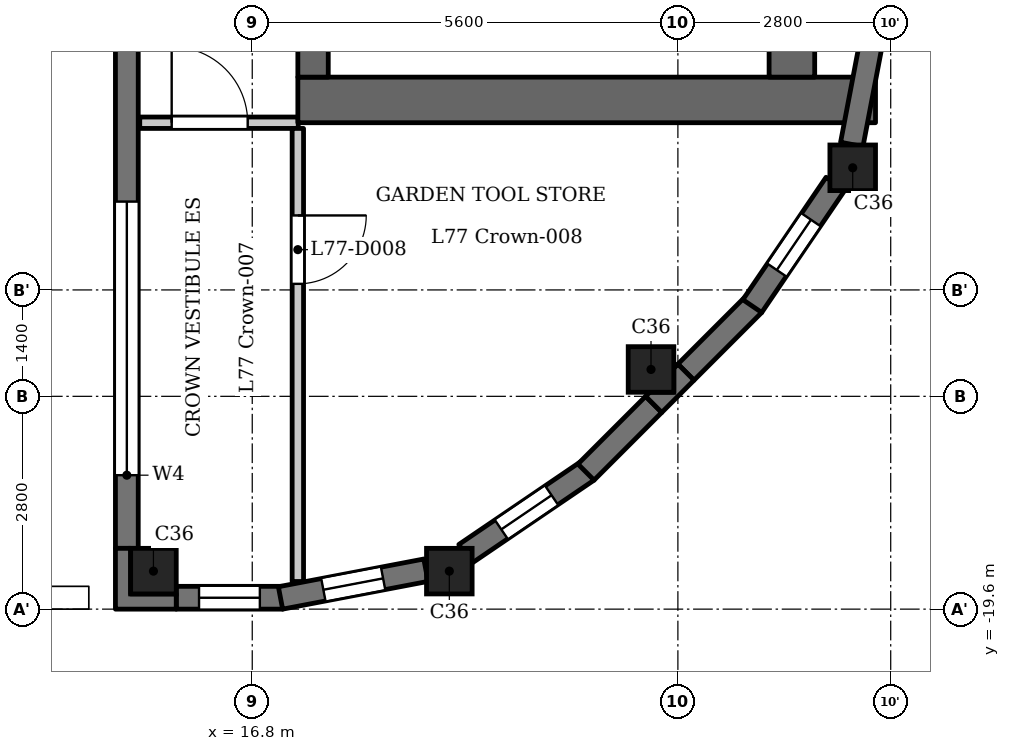
"""IFC4 building model, lengths in metres.
Left out: names, types, materials, properties, quantities, classifications, styles, units other than length and angle.
Written with IfcOpenShell. Run it as: python <this file> out.ifc"""

import sys

from ifc_helpers import new_model, si_unit, direction, frame, frame_2d, origin, origin_2d, place, context, subcontext, project, spatial, polyline, rectangle, outline, extrude, element, fill, save


model = new_model("IFC4")
c1 = context("Model", 3, precision=1e-05, world=origin(), true_north=direction((0.0, 1.0)))
c2 = subcontext(c1, "Body", "Model", "MODEL_VIEW")
j1 = project(units=[si_unit("LENGTHUNIT", "METRE"), si_unit("PLANEANGLEUNIT", "RADIAN")], contexts=[c1])
p1 = place(None, origin())
s1 = spatial("IfcSite", under=j1, at=p1, CompositionType="ELEMENT")
p2 = place(p1, origin())
s2 = spatial("IfcBuilding", under=s1, at=p2, CompositionType="ELEMENT")
p3 = place(p2, frame((0.0, 0.0, 299.9)))
s3 = spatial("IfcBuildingStorey", under=s2, at=p3, CompositionType="ELEMENT", Elevation=299.9)
for number, where, z_axis, x_axis in (
    (1, (15.5, -19.1, 0.0), (0.0, 0.0, 1.0), (1.0, 0.0, 0.0)),
    (2, (19.393, -19.1, 0.0), (0.0, 0.0, 1.0), (1.0, 0.0, 0.0)),
    (3, (22.046, -16.446, 0.0), (0.0, 0.0, 1.0), (1.0, 0.0, 0.0)),
    (4, (24.7, -13.793, 0.0), (0.0, 0.0, 1.0), (1.0, 0.0, 0.0)),
):
    element("IfcColumn", number, at=place(p3, frame(where, z_axis=z_axis, x_axis=x_axis)), inside=s3, PredefinedType="COLUMN", context=c2, shape_type="SweptSolid", body=[
        extrude(rectangle(XDim=0.6, YDim=0.6, at=origin_2d()), origin(), (0.0, 0.0, 1.0), 3.5),
    ])
p4 = place(p3, frame((15.15, -11.5, 0.0), z_axis=(0.0, 0.0, 1.0), x_axis=(0.0, -1.0, 0.0)))
e5 = element("IfcWall", 5, at=p4, inside=s3, PredefinedType="SOLIDWALL", context=c2, shape_type="SweptSolid", body=[
    extrude(rectangle(XDim=7.3, YDim=0.3, at=frame_2d((3.65, 0.0))), origin(), (0.0, 0.0, 1.0), 3.2),
])
p5 = place(p4, frame((2.738, 0.0, 1.2)))
e6 = element("IfcOpeningElement", 6, at=p5, cuts=e5, PredefinedType="OPENING", context=c2, shape_type="SweptSolid", body=[
    extrude(rectangle(XDim=3.6, YDim=0.95, at=frame_2d((1.8, 0.475))), frame((0.0, 0.16, 0.0), z_axis=(0.0, -1.0, 0.0), x_axis=(1.0, 0.0, 0.0)), (0.0, 0.0, 1.0), 0.32),
])
p6 = place(p3, frame((15.8, -19.45, 0.0), z_axis=(0.0, 0.0, 1.0), x_axis=(1.0, 0.0, 0.0)))
e7 = element("IfcWall", 7, at=p6, inside=s3, PredefinedType="SOLIDWALL", context=c2, shape_type="SweptSolid", body=[
    extrude(rectangle(XDim=1.4, YDim=0.3, at=frame_2d((0.7, 0.0))), origin(), (0.0, 0.0, 1.0), 3.2),
])
p7 = place(p6, frame((0.3, 0.0, 0.6)))
e8 = element("IfcOpeningElement", 8, at=p7, cuts=e7, PredefinedType="OPENING", context=c2, shape_type="SweptSolid", body=[
    extrude(rectangle(XDim=0.8, YDim=1.55, at=frame_2d((0.4, 0.775))), frame((0.0, 0.16, 0.0), z_axis=(0.0, -1.0, 0.0), x_axis=(1.0, 0.0, 0.0)), (0.0, 0.0, 1.0), 0.32),
])
p8 = place(p3, frame((17.172, -19.453, 0.0), z_axis=(0.0, 0.0, 1.0), x_axis=(0.982286967073, 0.187382801553, 0.0)))
e9 = element("IfcWall", 9, at=p8, inside=s3, PredefinedType="SOLIDWALL", context=c2, shape_type="SweptSolid", body=[
    extrude(rectangle(XDim=1.948, YDim=0.3, at=frame_2d((0.974, 0.0))), origin(), (0.0, 0.0, 1.0), 2.6),
])
p9 = place(p8, frame((0.574, 0.0, 0.6)))
e10 = element("IfcOpeningElement", 10, at=p9, cuts=e9, PredefinedType="OPENING", context=c2, shape_type="SweptSolid", body=[
    extrude(rectangle(XDim=0.8, YDim=1.55, at=frame_2d((0.4, 0.775))), frame((0.0, 0.16, 0.0), z_axis=(0.0, -1.0, 0.0), x_axis=(1.0, 0.0, 0.0)), (0.0, 0.0, 1.0), 0.32),
])
p10 = place(p3, frame((19.602, -18.874, 0.0), z_axis=(0.0, 0.0, 1.0), x_axis=(0.827022075481, 0.562169446579, 0.0)))
e11 = element("IfcWall", 11, at=p10, inside=s3, PredefinedType="SOLIDWALL", context=c2, shape_type="SweptSolid", body=[
    extrude(rectangle(XDim=1.948, YDim=0.3, at=frame_2d((0.974, 0.0))), origin(), (0.0, 0.0, 1.0), 2.6),
])
p11 = place(p10, frame((0.574, 0.0, 0.6)))
e12 = element("IfcOpeningElement", 12, at=p11, cuts=e11, PredefinedType="OPENING", context=c2, shape_type="SweptSolid", body=[
    extrude(rectangle(XDim=0.8, YDim=1.55, at=frame_2d((0.4, 0.775))), frame((0.0, 0.16, 0.0), z_axis=(0.0, -1.0, 0.0), x_axis=(1.0, 0.0, 0.0)), (0.0, 0.0, 1.0), 0.32),
])
for number, where, z_axis, x_axis in (
    (13, (21.191, -17.797, 0.0), (0.0, 0.0, 1.0), (0.707, 0.707, 0.0)),
    (14, (22.506, -16.482, 0.0), (0.0, 0.0, 1.0), (0.707, 0.707, 0.0)),
):
    element("IfcWall", number, at=place(p3, frame(where, z_axis=z_axis, x_axis=x_axis)), inside=s3, PredefinedType="SOLIDWALL", context=c2, shape_type="SweptSolid", body=[
        extrude(rectangle(XDim=1.26, YDim=0.3, at=frame_2d((0.63, 0.0))), origin(), (0.0, 0.0, 1.0), 3.2),
    ])
p12 = place(p3, frame((23.379, -15.613, 0.0), z_axis=(0.0, 0.0, 1.0), x_axis=(0.562025435703, 0.827119948752, 0.0)))
e15 = element("IfcWall", 15, at=p12, inside=s3, PredefinedType="SOLIDWALL", context=c2, shape_type="SweptSolid", body=[
    extrude(rectangle(XDim=1.948, YDim=0.3, at=frame_2d((0.974, 0.0))), origin(), (0.0, 0.0, 1.0), 2.6),
])
p13 = place(p12, frame((0.574, 0.0, 0.6)))
e16 = element("IfcOpeningElement", 16, at=p13, cuts=e15, PredefinedType="OPENING", context=c2, shape_type="SweptSolid", body=[
    extrude(rectangle(XDim=0.8, YDim=1.55, at=frame_2d((0.4, 0.775))), frame((0.0, 0.16, 0.0), z_axis=(0.0, -1.0, 0.0), x_axis=(1.0, 0.0, 0.0)), (0.0, 0.0, 1.0), 0.32),
])
p14 = place(p3, frame((24.688, -13.485, 0.0), z_axis=(0.0, 0.0, 1.0), x_axis=(0.187354129902, 0.982292436095, 0.0)))
e17 = element("IfcWall", 17, at=p14, inside=s3, PredefinedType="SOLIDWALL", context=c2, shape_type="SweptSolid", body=[
    extrude(rectangle(XDim=1.947, YDim=0.3, at=frame_2d((0.973, 0.0))), origin(), (0.0, 0.0, 1.0), 2.6),
])
p15 = place(p3, origin())
e18 = element("IfcWall", 18, at=p15, inside=s3, PredefinedType="PARAPET", context=c2, shape_type="SweptSolid", body=[
    extrude(outline(polyline([(-14.65, -19.6), (14.65, -19.6), (14.65, -19.3), (-14.65, -19.3), (-14.65, -19.6)])), origin(), (0.0, 0.0, 1.0), 1.1),
])
p16 = place(p3, frame((17.4, -12.9, 0.0), z_axis=(0.0, 0.0, 1.0), x_axis=(1.0, 0.0, 0.0)))
e19 = element("IfcWall", 19, at=p16, inside=s3, PredefinedType="SHEAR", context=c2, shape_type="SweptSolid", body=[
    extrude(rectangle(XDim=7.6, YDim=0.6, at=frame_2d((3.8, 0.0))), origin(), (0.0, 0.0, 1.0), 3.2),
])
p17 = place(p3, frame((17.6, -12.6, 0.0), z_axis=(0.0, 0.0, 1.0), x_axis=(0.0, 1.0, 0.0)))
e20 = element("IfcWall", 20, at=p17, inside=s3, PredefinedType="SHEAR", context=c2, shape_type="SweptSolid", body=[
    extrude(rectangle(XDim=25.2, YDim=0.4, at=frame_2d((12.6, 0.0))), origin(), (0.0, 0.0, 1.0), 3.2),
])
p18 = place(p17, frame((11.2, 0.0, 0.0)))
e21 = element("IfcOpeningElement", 21, at=p18, cuts=e20, PredefinedType="OPENING", context=c2, shape_type="SweptSolid", body=[
    extrude(rectangle(XDim=0.9, YDim=2.1, at=frame_2d((0.45, 1.05))), frame((0.0, 0.21, 0.0), z_axis=(0.0, -1.0, 0.0), x_axis=(1.0, 0.0, 0.0)), (0.0, 0.0, 1.0), 0.42),
])
p19 = place(p17, frame((17.05, 0.0, 0.0)))
e22 = element("IfcOpeningElement", 22, at=p19, cuts=e20, PredefinedType="OPENING", context=c2, shape_type="SweptSolid", body=[
    extrude(rectangle(XDim=0.9, YDim=2.1, at=frame_2d((0.45, 1.05))), frame((0.0, 0.21, 0.0), z_axis=(0.0, -1.0, 0.0), x_axis=(1.0, 0.0, 0.0)), (0.0, 0.0, 1.0), 0.42),
])
p20 = place(p17, frame((23.25, 0.0, 0.0)))
e23 = element("IfcOpeningElement", 23, at=p20, cuts=e20, PredefinedType="OPENING", context=c2, shape_type="SweptSolid", body=[
    extrude(rectangle(XDim=1.1, YDim=2.1, at=frame_2d((0.55, 1.05))), frame((0.0, 0.21, 0.0), z_axis=(0.0, -1.0, 0.0), x_axis=(1.0, 0.0, 0.0)), (0.0, 0.0, 1.0), 0.42),
])
p21 = place(p17, frame((0.85, 0.0, 0.0)))
e24 = element("IfcOpeningElement", 24, at=p21, cuts=e20, PredefinedType="OPENING", context=c2, shape_type="SweptSolid", body=[
    extrude(rectangle(XDim=1.1, YDim=2.1, at=frame_2d((0.55, 1.05))), frame((0.0, 0.21, 0.0), z_axis=(0.0, -1.0, 0.0), x_axis=(1.0, 0.0, 0.0)), (0.0, 0.0, 1.0), 0.42),
])
p22 = place(p17, frame((13.075, 0.0, 0.0)))
e25 = element("IfcOpeningElement", 25, at=p22, cuts=e20, PredefinedType="OPENING", context=c2, shape_type="SweptSolid", body=[
    extrude(rectangle(XDim=1.8, YDim=2.1, at=frame_2d((0.9, 1.05))), frame((0.0, 0.21, 0.0), z_axis=(0.0, -1.0, 0.0), x_axis=(1.0, 0.0, 0.0)), (0.0, 0.0, 1.0), 0.42),
])
p23 = place(p3, frame((23.9, -12.6, 0.0), z_axis=(0.0, 0.0, 1.0), x_axis=(0.0, 1.0, 0.0)))
e26 = element("IfcWall", 26, at=p23, inside=s3, PredefinedType="SHEAR", context=c2, shape_type="SweptSolid", body=[
    extrude(rectangle(XDim=25.2, YDim=0.6, at=frame_2d((12.6, 0.0))), origin(), (0.0, 0.0, 1.0), 3.2),
])
p24 = place(p3, frame((15.32, -13.2, 0.0), z_axis=(0.0, 0.0, 1.0), x_axis=(1.0, 0.0, 0.0)))
e27 = element("IfcWall", 27, at=p24, inside=s3, PredefinedType="PARTITIONING", context=c2, shape_type="SweptSolid", body=[
    extrude(rectangle(XDim=2.085, YDim=0.15, at=frame_2d((1.042, 0.0))), origin(), (0.0, 0.0, 1.0), 3.2),
])
p25 = place(p24, frame((0.42, 0.0, 0.0)))
e28 = element("IfcOpeningElement", 28, at=p25, cuts=e27, PredefinedType="OPENING", context=c2, shape_type="SweptSolid", body=[
    extrude(rectangle(XDim=1.0, YDim=2.1, at=frame_2d((0.5, 1.05))), frame((0.0, 0.085, 0.0), z_axis=(0.0, -1.0, 0.0), x_axis=(1.0, 0.0, 0.0)), (0.0, 0.0, 1.0), 0.17),
])
p26 = place(p3, frame((17.4, -19.236, 0.0), z_axis=(0.0, 0.0, 1.0), x_axis=(0.0, 1.0, 0.0)))
e29 = element("IfcWall", 29, at=p26, inside=s3, PredefinedType="PARTITIONING", context=c2, shape_type="SweptSolid", body=[
    extrude(rectangle(XDim=5.961, YDim=0.15, at=frame_2d((2.981, 0.0))), origin(), (0.0, 0.0, 1.0), 3.2),
])
p27 = place(p26, frame((3.917, 0.0, 0.0)))
e30 = element("IfcOpeningElement", 30, at=p27, cuts=e29, PredefinedType="OPENING", context=c2, shape_type="SweptSolid", body=[
    extrude(rectangle(XDim=0.9, YDim=2.1, at=frame_2d((0.45, 1.05))), frame((0.0, 0.085, 0.0), z_axis=(0.0, -1.0, 0.0), x_axis=(1.0, 0.0, 0.0)), (0.0, 0.0, 1.0), 0.17),
])
e31 = element("IfcWall", 31, at=p15, inside=s3, PredefinedType="SOLIDWALL", context=c2, shape_type="SweptSolid", body=[
    extrude(outline(polyline([(21.976, -16.8), (22.188, -17.012), (22.612, -16.588), (22.4, -16.376), (22.346, -16.429), (22.346, -16.746), (22.029, -16.746), (21.976, -16.8)])), origin(), (0.0, 0.0, 1.0), 3.2),
])
e32 = element("IfcWall", 32, at=p15, inside=s3, PredefinedType="SOLIDWALL", context=c2, shape_type="SweptSolid", body=[
    extrude(outline(polyline([(15.0, -18.8), (15.0, -19.6), (15.8, -19.6), (15.8, -19.4), (15.2, -19.4), (15.2, -18.8), (15.0, -18.8)])), origin(), (0.0, 0.0, 1.0), 3.2),
])
p28 = place(p25, origin())
e33 = element("IfcDoor", 33, at=p28, inside=s3, OperationType="SINGLE_SWING_RIGHT", PredefinedType="DOOR", context=c2, shape_type="SweptSolid", body=[
    extrude(rectangle(XDim=1.0, YDim=2.1, at=frame_2d((0.5, 1.05))), frame((0.0, 0.025, 0.0), z_axis=(0.0, -1.0, 0.0), x_axis=(1.0, 0.0, 0.0)), (0.0, 0.0, 1.0), 0.05),
])
fill(e28, e33)
p29 = place(p27, origin())
e34 = element("IfcDoor", 34, at=p29, inside=s3, OperationType="SINGLE_SWING_RIGHT", PredefinedType="DOOR", context=c2, shape_type="SweptSolid", body=[
    extrude(rectangle(XDim=0.9, YDim=2.1, at=frame_2d((0.45, 1.05))), frame((0.0, 0.025, 0.0), z_axis=(0.0, -1.0, 0.0), x_axis=(1.0, 0.0, 0.0)), (0.0, 0.0, 1.0), 0.05),
])
fill(e30, e34)
p30 = place(p5, origin())
e35 = element("IfcWindow", 35, at=p30, inside=s3, PartitioningType="SINGLE_PANEL", PredefinedType="WINDOW", context=c2, shape_type="SweptSolid", body=[
    extrude(rectangle(XDim=3.6, YDim=0.95, at=frame_2d((1.8, 0.475))), frame((0.0, 0.03, 0.0), z_axis=(0.0, -1.0, 0.0), x_axis=(1.0, 0.0, 0.0)), (0.0, 0.0, 1.0), 0.06),
])
fill(e6, e35)
p31 = place(p7, origin())
e36 = element("IfcWindow", 36, at=p31, inside=s3, PartitioningType="SINGLE_PANEL", PredefinedType="WINDOW", context=c2, shape_type="SweptSolid", body=[
    extrude(rectangle(XDim=0.8, YDim=1.55, at=frame_2d((0.4, 0.775))), frame((0.0, 0.03, 0.0), z_axis=(0.0, -1.0, 0.0), x_axis=(1.0, 0.0, 0.0)), (0.0, 0.0, 1.0), 0.06),
])
fill(e8, e36)
p32 = place(p9, origin())
e37 = element("IfcWindow", 37, at=p32, inside=s3, PartitioningType="SINGLE_PANEL", PredefinedType="WINDOW", context=c2, shape_type="SweptSolid", body=[
    extrude(rectangle(XDim=0.8, YDim=1.55, at=frame_2d((0.4, 0.775))), frame((0.0, 0.03, 0.0), z_axis=(0.0, -1.0, 0.0), x_axis=(1.0, 0.0, 0.0)), (0.0, 0.0, 1.0), 0.06),
])
fill(e10, e37)
p33 = place(p11, origin())
e38 = element("IfcWindow", 38, at=p33, inside=s3, PartitioningType="SINGLE_PANEL", PredefinedType="WINDOW", context=c2, shape_type="SweptSolid", body=[
    extrude(rectangle(XDim=0.8, YDim=1.55, at=frame_2d((0.4, 0.775))), frame((0.0, 0.03, 0.0), z_axis=(0.0, -1.0, 0.0), x_axis=(1.0, 0.0, 0.0)), (0.0, 0.0, 1.0), 0.06),
])
fill(e12, e38)
p34 = place(p13, origin())
e39 = element("IfcWindow", 39, at=p34, inside=s3, PartitioningType="SINGLE_PANEL", PredefinedType="WINDOW", context=c2, shape_type="SweptSolid", body=[
    extrude(rectangle(XDim=0.8, YDim=1.55, at=frame_2d((0.4, 0.775))), frame((0.0, 0.03, 0.0), z_axis=(0.0, -1.0, 0.0), x_axis=(1.0, 0.0, 0.0)), (0.0, 0.0, 1.0), 0.06),
])
fill(e16, e39)
save(model, sys.argv[1])
